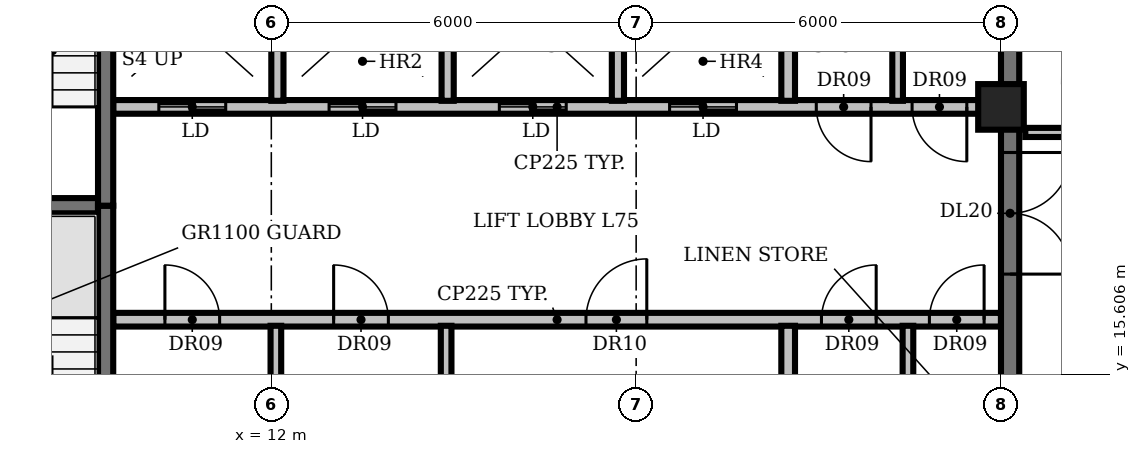
"""IFC4 building model, lengths in metres.
Left out: names, types, materials, properties, quantities, classifications, styles, units other than length and angle.
Written with IfcOpenShell. Run it as: python <this file> out.ifc"""

import sys

from ifc_helpers import new_model, si_unit, direction, frame, frame_2d, origin, origin_2d, place, context, subcontext, project, spatial, rectangle, circle, extrude, element, fill, save


model = new_model("IFC4")
c1 = context("Model", 3, precision=1e-05, world=origin(), true_north=direction((0.0, 1.0)))
c2 = subcontext(c1, "Body", "Model", "MODEL_VIEW")
j1 = project(units=[si_unit("LENGTHUNIT", "METRE"), si_unit("PLANEANGLEUNIT", "RADIAN")], contexts=[c1])
p1 = place(None, origin())
s1 = spatial("IfcSite", under=j1, at=p1, CompositionType="ELEMENT")
p2 = place(p1, origin())
s2 = spatial("IfcBuilding", under=s1, at=p2, CompositionType="ELEMENT")
p3 = place(p2, frame((0.0, 0.0, 335.6)))
s3 = spatial("IfcBuildingStorey", under=s2, at=p3, CompositionType="ELEMENT", Elevation=335.6)
p4 = place(p3, frame((24.0, 20.0, 0.0), z_axis=(0.0, 0.0, 1.0), x_axis=(1.0, 0.0, 0.0)))
e1 = element("IfcColumn", 1, at=p4, inside=s3, PredefinedType="COLUMN", context=c2, shape_type="SweptSolid", body=[
    extrude(circle(Radius=0.375, at=origin_2d()), origin(), (0.0, 0.0, 1.0), 3.9),
])
p5 = place(p3, frame((9.4, 16.5, 0.0), z_axis=(0.0, 0.0, 1.0), x_axis=(1.0, 0.0, 0.0)))
e2 = element("IfcWall", 2, at=p5, inside=s3, PredefinedType="PARTITIONING", context=c2, shape_type="SweptSolid", body=[
    extrude(rectangle(XDim=14.6, YDim=0.225, at=frame_2d((7.3, 0.0))), origin(), (0.0, 0.0, 1.0), 3.9),
])
p6 = place(p5, frame((0.85, 0.0, 0.0)))
e3 = element("IfcOpeningElement", 3, at=p6, cuts=e2, PredefinedType="OPENING", context=c2, shape_type="SweptSolid", body=[
    extrude(rectangle(XDim=0.9, YDim=2.1, at=frame_2d((0.45, 1.05))), frame((0.0, 0.123, 0.0), z_axis=(0.0, -1.0, 0.0), x_axis=(1.0, 0.0, 0.0)), (0.0, 0.0, 1.0), 0.245),
])
p7 = place(p5, frame((3.625, 0.0, 0.0)))
e4 = element("IfcOpeningElement", 4, at=p7, cuts=e2, PredefinedType="OPENING", context=c2, shape_type="SweptSolid", body=[
    extrude(rectangle(XDim=0.9, YDim=2.1, at=frame_2d((0.45, 1.05))), frame((0.0, 0.123, 0.0), z_axis=(0.0, -1.0, 0.0), x_axis=(1.0, 0.0, 0.0)), (0.0, 0.0, 1.0), 0.245),
])
p8 = place(p5, frame((7.775, 0.0, 0.0)))
e5 = element("IfcOpeningElement", 5, at=p8, cuts=e2, PredefinedType="OPENING", context=c2, shape_type="SweptSolid", body=[
    extrude(rectangle(XDim=1.0, YDim=2.1, at=frame_2d((0.5, 1.05))), frame((0.0, 0.123, 0.0), z_axis=(0.0, -1.0, 0.0), x_axis=(1.0, 0.0, 0.0)), (0.0, 0.0, 1.0), 0.245),
])
p9 = place(p5, frame((11.647, 0.0, 0.0)))
e6 = element("IfcOpeningElement", 6, at=p9, cuts=e2, PredefinedType="OPENING", context=c2, shape_type="SweptSolid", body=[
    extrude(rectangle(XDim=0.9, YDim=2.1, at=frame_2d((0.45, 1.05))), frame((0.0, 0.123, 0.0), z_axis=(0.0, -1.0, 0.0), x_axis=(1.0, 0.0, 0.0)), (0.0, 0.0, 1.0), 0.245),
])
p10 = place(p5, frame((13.423, 0.0, 0.0)))
e7 = element("IfcOpeningElement", 7, at=p10, cuts=e2, PredefinedType="OPENING", context=c2, shape_type="SweptSolid", body=[
    extrude(rectangle(XDim=0.9, YDim=2.1, at=frame_2d((0.45, 1.05))), frame((0.0, 0.123, 0.0), z_axis=(0.0, -1.0, 0.0), x_axis=(1.0, 0.0, 0.0)), (0.0, 0.0, 1.0), 0.245),
])
p11 = place(p3, frame((6.0, 18.375, 0.0), z_axis=(0.0, 0.0, 1.0), x_axis=(1.0, 0.0, 0.0)))
e8 = element("IfcWall", 8, at=p11, inside=s3, PredefinedType="SHEAR", context=c2, shape_type="SweptSolid", body=[
    extrude(rectangle(XDim=3.15, YDim=0.25, at=frame_2d((1.575, 0.0))), origin(), (0.0, 0.0, 1.0), 3.9),
])
p12 = place(p3, frame((24.0, 20.0, 0.0), z_axis=(0.0, 0.0, 1.0), x_axis=(-1.0, 0.0, 0.0)))
e9 = element("IfcWall", 9, at=p12, inside=s3, PredefinedType="PARTITIONING", context=c2, shape_type="SweptSolid", body=[
    extrude(rectangle(XDim=14.6, YDim=0.225, at=frame_2d((7.3, 0.0))), origin(), (0.0, 0.0, 1.0), 3.9),
])
p13 = place(p12, frame((12.75, 0.0, 0.0)))
e10 = element("IfcOpeningElement", 10, at=p13, cuts=e9, PredefinedType="OPENING", context=c2, shape_type="SweptSolid", body=[
    extrude(rectangle(XDim=1.1, YDim=2.1, at=frame_2d((0.55, 1.05))), frame((0.0, 0.123, 0.0), z_axis=(0.0, -1.0, 0.0), x_axis=(1.0, 0.0, 0.0)), (0.0, 0.0, 1.0), 0.245),
])
p14 = place(p12, frame((9.95, 0.0, 0.0)))
e11 = element("IfcOpeningElement", 11, at=p14, cuts=e9, PredefinedType="OPENING", context=c2, shape_type="SweptSolid", body=[
    extrude(rectangle(XDim=1.1, YDim=2.1, at=frame_2d((0.55, 1.05))), frame((0.0, 0.123, 0.0), z_axis=(0.0, -1.0, 0.0), x_axis=(1.0, 0.0, 0.0)), (0.0, 0.0, 1.0), 0.245),
])
p15 = place(p12, frame((7.15, 0.0, 0.0)))
e12 = element("IfcOpeningElement", 12, at=p15, cuts=e9, PredefinedType="OPENING", context=c2, shape_type="SweptSolid", body=[
    extrude(rectangle(XDim=1.1, YDim=2.1, at=frame_2d((0.55, 1.05))), frame((0.0, 0.123, 0.0), z_axis=(0.0, -1.0, 0.0), x_axis=(1.0, 0.0, 0.0)), (0.0, 0.0, 1.0), 0.245),
])
p16 = place(p12, frame((4.35, 0.0, 0.0)))
e13 = element("IfcOpeningElement", 13, at=p16, cuts=e9, PredefinedType="OPENING", context=c2, shape_type="SweptSolid", body=[
    extrude(rectangle(XDim=1.1, YDim=2.1, at=frame_2d((0.55, 1.05))), frame((0.0, 0.123, 0.0), z_axis=(0.0, -1.0, 0.0), x_axis=(1.0, 0.0, 0.0)), (0.0, 0.0, 1.0), 0.245),
])
p17 = place(p12, frame((2.137, 0.0, 0.0)))
e14 = element("IfcOpeningElement", 14, at=p17, cuts=e9, PredefinedType="OPENING", context=c2, shape_type="SweptSolid", body=[
    extrude(rectangle(XDim=0.9, YDim=2.1, at=frame_2d((0.45, 1.05))), frame((0.0, 0.123, 0.0), z_axis=(0.0, -1.0, 0.0), x_axis=(1.0, 0.0, 0.0)), (0.0, 0.0, 1.0), 0.245),
])
p18 = place(p12, frame((0.562, 0.0, 0.0)))
e15 = element("IfcOpeningElement", 15, at=p18, cuts=e9, PredefinedType="OPENING", context=c2, shape_type="SweptSolid", body=[
    extrude(rectangle(XDim=0.9, YDim=2.1, at=frame_2d((0.45, 1.05))), frame((0.0, 0.123, 0.0), z_axis=(0.0, -1.0, 0.0), x_axis=(1.0, 0.0, 0.0)), (0.0, 0.0, 1.0), 0.245),
])
p19 = place(p3, frame((9.275, 18.375, 0.0), z_axis=(0.0, 0.0, 1.0), x_axis=(0.0, -1.0, 0.0)))
e16 = element("IfcWall", 16, at=p19, inside=s3, PredefinedType="SHEAR", context=c2, shape_type="SweptSolid", body=[
    extrude(rectangle(XDim=6.55, YDim=0.25, at=frame_2d((3.275, 0.0))), origin(), (0.0, 0.0, 1.0), 3.9),
])
p20 = place(p19, frame((5.075, 0.0, 0.0)))
e17 = element("IfcOpeningElement", 17, at=p20, cuts=e16, PredefinedType="OPENING", context=c2, shape_type="SweptSolid", body=[
    extrude(rectangle(XDim=1.0, YDim=2.1, at=frame_2d((0.5, 1.05))), frame((0.0, 0.135, 0.0), z_axis=(0.0, -1.0, 0.0), x_axis=(1.0, 0.0, 0.0)), (0.0, 0.0, 1.0), 0.27),
])
p21 = place(p3, frame((9.275, 18.375, 0.0), z_axis=(0.0, 0.0, 1.0), x_axis=(0.0, 1.0, 0.0)))
e18 = element("IfcWall", 18, at=p21, inside=s3, PredefinedType="SHEAR", context=c2, shape_type="SweptSolid", body=[
    extrude(rectangle(XDim=6.425, YDim=0.25, at=frame_2d((3.212, 0.0))), origin(), (0.0, 0.0, 1.0), 3.9),
])
p22 = place(p3, frame((12.075, 13.8, 0.0), z_axis=(0.0, 0.0, 1.0), x_axis=(0.0, 1.0, 0.0)))
e19 = element("IfcWall", 19, at=p22, inside=s3, PredefinedType="PARTITIONING", context=c2, shape_type="SweptSolid", body=[
    extrude(rectangle(XDim=2.6, YDim=0.175, at=frame_2d((1.3, 0.0))), origin(), (0.0, 0.0, 1.0), 3.9),
])
p23 = place(p3, frame((12.1, 20.1, 0.0), z_axis=(0.0, 0.0, 1.0), x_axis=(0.0, 1.0, 0.0)))
e20 = element("IfcWall", 20, at=p23, inside=s3, PredefinedType="SOLIDWALL", context=c2, shape_type="SweptSolid", body=[
    extrude(rectangle(XDim=2.6, YDim=0.2, at=frame_2d((1.3, 0.0))), origin(), (0.0, 0.0, 1.0), 3.9),
])
p24 = place(p3, frame((14.875, 13.8, 0.0), z_axis=(0.0, 0.0, 1.0), x_axis=(0.0, 1.0, 0.0)))
e21 = element("IfcWall", 21, at=p24, inside=s3, PredefinedType="PARTITIONING", context=c2, shape_type="SweptSolid", body=[
    extrude(rectangle(XDim=2.6, YDim=0.175, at=frame_2d((1.3, 0.0))), origin(), (0.0, 0.0, 1.0), 3.9),
])
for number, where, z_axis, x_axis in (
    (22, (14.9, 20.1, 0.0), (0.0, 0.0, 1.0), (0.0, 1.0, 0.0)),
    (23, (17.7, 20.1, 0.0), (0.0, 0.0, 1.0), (0.0, 1.0, 0.0)),
):
    element("IfcWall", number, at=place(p3, frame(where, z_axis=z_axis, x_axis=x_axis)), inside=s3, PredefinedType="SOLIDWALL", context=c2, shape_type="SweptSolid", body=[
        extrude(rectangle(XDim=2.6, YDim=0.2, at=frame_2d((1.3, 0.0))), origin(), (0.0, 0.0, 1.0), 3.9),
    ])
for number, where, z_axis, x_axis in (
    (24, (20.5, 13.8, 0.0), (0.0, 0.0, 1.0), (0.0, 1.0, 0.0)),
    (25, (20.5, 20.1, 0.0), (0.0, 0.0, 1.0), (0.0, 1.0, 0.0)),
):
    element("IfcWall", number, at=place(p3, frame(where, z_axis=z_axis, x_axis=x_axis)), inside=s3, PredefinedType="PARTITIONING", context=c2, shape_type="SweptSolid", body=[
        extrude(rectangle(XDim=2.6, YDim=0.225, at=frame_2d((1.3, 0.0))), origin(), (0.0, 0.0, 1.0), 3.9),
    ])
for number, where, z_axis, x_axis in (
    (26, (22.3, 20.1, 0.0), (0.0, 0.0, 1.0), (0.0, 1.0, 0.0)),
    (27, (22.47, 13.8, 0.0), (0.0, 0.0, 1.0), (0.0, 1.0, 0.0)),
):
    element("IfcWall", number, at=place(p3, frame(where, z_axis=z_axis, x_axis=x_axis)), inside=s3, PredefinedType="PARTITIONING", context=c2, shape_type="SweptSolid", body=[
        extrude(rectangle(XDim=2.6, YDim=0.175, at=frame_2d((1.3, 0.0))), origin(), (0.0, 0.0, 1.0), 3.9),
    ])
p25 = place(p3, frame((24.15, 25.705, 0.0), z_axis=(0.0, 0.0, 1.0), x_axis=(0.0, -1.0, 0.0)))
e28 = element("IfcWall", 28, at=p25, inside=s3, PredefinedType="SHEAR", context=c2, shape_type="SweptSolid", body=[
    extrude(rectangle(XDim=20.605, YDim=0.3, at=frame_2d((10.302, 0.0))), origin(), (0.0, 0.0, 1.0), 3.9),
])
p26 = place(p25, frame((18.555, 0.0, 0.0)))
e29 = element("IfcOpeningElement", 29, at=p26, cuts=e28, PredefinedType="OPENING", context=c2, shape_type="SweptSolid", body=[
    extrude(rectangle(XDim=1.5, YDim=2.1, at=frame_2d((0.75, 1.05))), frame((0.0, 0.16, 0.0), z_axis=(0.0, -1.0, 0.0), x_axis=(1.0, 0.0, 0.0)), (0.0, 0.0, 1.0), 0.32),
])
p27 = place(p25, frame((12.455, 0.0, 0.0)))
e30 = element("IfcOpeningElement", 30, at=p27, cuts=e28, PredefinedType="OPENING", context=c2, shape_type="SweptSolid", body=[
    extrude(rectangle(XDim=0.9, YDim=2.1, at=frame_2d((0.45, 1.05))), frame((0.0, 0.16, 0.0), z_axis=(0.0, -1.0, 0.0), x_axis=(1.0, 0.0, 0.0)), (0.0, 0.0, 1.0), 0.32),
])
p28 = place(p25, frame((6.455, 0.0, 0.0)))
e31 = element("IfcOpeningElement", 31, at=p28, cuts=e28, PredefinedType="OPENING", context=c2, shape_type="SweptSolid", body=[
    extrude(rectangle(XDim=2.0, YDim=2.1, at=frame_2d((1.0, 1.05))), frame((0.0, 0.16, 0.0), z_axis=(0.0, -1.0, 0.0), x_axis=(1.0, 0.0, 0.0)), (0.0, 0.0, 1.0), 0.32),
])
p29 = place(p3, frame((24.4, 19.58, 0.0), z_axis=(0.0, 0.0, 1.0), x_axis=(1.0, 0.0, 0.0)))
e32 = element("IfcWall", 32, at=p29, inside=s3, PredefinedType="PARTITIONING", context=c2, shape_type="SweptSolid", body=[
    extrude(rectangle(XDim=1.41, YDim=0.15, at=frame_2d((0.705, 0.0))), origin(), (0.0, 0.0, 1.0), 2.95),
])
p30 = place(p6, origin())
e33 = element("IfcDoor", 33, at=p30, inside=s3, OperationType="SINGLE_SWING_LEFT", PredefinedType="DOOR", context=c2, shape_type="SweptSolid", body=[
    extrude(rectangle(XDim=0.9, YDim=2.1, at=frame_2d((0.45, 1.05))), frame((0.0, 0.025, 0.0), z_axis=(0.0, -1.0, 0.0), x_axis=(1.0, 0.0, 0.0)), (0.0, 0.0, 1.0), 0.05),
])
fill(e3, e33)
p31 = place(p7, origin())
e34 = element("IfcDoor", 34, at=p31, inside=s3, OperationType="SINGLE_SWING_LEFT", PredefinedType="DOOR", context=c2, shape_type="SweptSolid", body=[
    extrude(rectangle(XDim=0.9, YDim=2.1, at=frame_2d((0.45, 1.05))), frame((0.0, 0.025, 0.0), z_axis=(0.0, -1.0, 0.0), x_axis=(1.0, 0.0, 0.0)), (0.0, 0.0, 1.0), 0.05),
])
fill(e4, e34)
p32 = place(p8, origin())
e35 = element("IfcDoor", 35, at=p32, inside=s3, OperationType="SINGLE_SWING_RIGHT", PredefinedType="DOOR", context=c2, shape_type="SweptSolid", body=[
    extrude(rectangle(XDim=1.0, YDim=2.1, at=frame_2d((0.5, 1.05))), frame((0.0, 0.025, 0.0), z_axis=(0.0, -1.0, 0.0), x_axis=(1.0, 0.0, 0.0)), (0.0, 0.0, 1.0), 0.05),
])
fill(e5, e35)
p33 = place(p9, origin())
e36 = element("IfcDoor", 36, at=p33, inside=s3, OperationType="SINGLE_SWING_RIGHT", PredefinedType="DOOR", context=c2, shape_type="SweptSolid", body=[
    extrude(rectangle(XDim=0.9, YDim=2.1, at=frame_2d((0.45, 1.05))), frame((0.0, 0.025, 0.0), z_axis=(0.0, -1.0, 0.0), x_axis=(1.0, 0.0, 0.0)), (0.0, 0.0, 1.0), 0.05),
])
fill(e6, e36)
p34 = place(p10, origin())
e37 = element("IfcDoor", 37, at=p34, inside=s3, OperationType="SINGLE_SWING_RIGHT", PredefinedType="DOOR", context=c2, shape_type="SweptSolid", body=[
    extrude(rectangle(XDim=0.9, YDim=2.1, at=frame_2d((0.45, 1.05))), frame((0.0, 0.025, 0.0), z_axis=(0.0, -1.0, 0.0), x_axis=(1.0, 0.0, 0.0)), (0.0, 0.0, 1.0), 0.05),
])
fill(e7, e37)
p35 = place(p13, origin())
e38 = element("IfcDoor", 38, at=p35, inside=s3, OperationType="DOUBLE_DOOR_SLIDING", PredefinedType="DOOR", context=c2, shape_type="SweptSolid", body=[
    extrude(rectangle(XDim=1.1, YDim=2.1, at=frame_2d((0.55, 1.05))), frame((0.0, 0.025, 0.0), z_axis=(0.0, -1.0, 0.0), x_axis=(1.0, 0.0, 0.0)), (0.0, 0.0, 1.0), 0.05),
])
fill(e10, e38)
p36 = place(p14, origin())
e39 = element("IfcDoor", 39, at=p36, inside=s3, OperationType="DOUBLE_DOOR_SLIDING", PredefinedType="DOOR", context=c2, shape_type="SweptSolid", body=[
    extrude(rectangle(XDim=1.1, YDim=2.1, at=frame_2d((0.55, 1.05))), frame((0.0, 0.025, 0.0), z_axis=(0.0, -1.0, 0.0), x_axis=(1.0, 0.0, 0.0)), (0.0, 0.0, 1.0), 0.05),
])
fill(e11, e39)
p37 = place(p15, origin())
e40 = element("IfcDoor", 40, at=p37, inside=s3, OperationType="DOUBLE_DOOR_SLIDING", PredefinedType="DOOR", context=c2, shape_type="SweptSolid", body=[
    extrude(rectangle(XDim=1.1, YDim=2.1, at=frame_2d((0.55, 1.05))), frame((0.0, 0.025, 0.0), z_axis=(0.0, -1.0, 0.0), x_axis=(1.0, 0.0, 0.0)), (0.0, 0.0, 1.0), 0.05),
])
fill(e12, e40)
p38 = place(p16, origin())
e41 = element("IfcDoor", 41, at=p38, inside=s3, OperationType="DOUBLE_DOOR_SLIDING", PredefinedType="DOOR", context=c2, shape_type="SweptSolid", body=[
    extrude(rectangle(XDim=1.1, YDim=2.1, at=frame_2d((0.55, 1.05))), frame((0.0, 0.025, 0.0), z_axis=(0.0, -1.0, 0.0), x_axis=(1.0, 0.0, 0.0)), (0.0, 0.0, 1.0), 0.05),
])
fill(e13, e41)
p39 = place(p17, origin())
e42 = element("IfcDoor", 42, at=p39, inside=s3, OperationType="SINGLE_SWING_LEFT", PredefinedType="DOOR", context=c2, shape_type="SweptSolid", body=[
    extrude(rectangle(XDim=0.9, YDim=2.1, at=frame_2d((0.45, 1.05))), frame((0.0, 0.025, 0.0), z_axis=(0.0, -1.0, 0.0), x_axis=(1.0, 0.0, 0.0)), (0.0, 0.0, 1.0), 0.05),
])
fill(e14, e42)
p40 = place(p18, origin())
e43 = element("IfcDoor", 43, at=p40, inside=s3, OperationType="SINGLE_SWING_LEFT", PredefinedType="DOOR", context=c2, shape_type="SweptSolid", body=[
    extrude(rectangle(XDim=0.9, YDim=2.1, at=frame_2d((0.45, 1.05))), frame((0.0, 0.025, 0.0), z_axis=(0.0, -1.0, 0.0), x_axis=(1.0, 0.0, 0.0)), (0.0, 0.0, 1.0), 0.05),
])
fill(e15, e43)
p41 = place(p28, origin())
e44 = element("IfcDoor", 44, at=p41, inside=s3, OperationType="DOUBLE_DOOR_SINGLE_SWING", PredefinedType="DOOR", context=c2, shape_type="SweptSolid", body=[
    extrude(rectangle(XDim=2.0, YDim=2.1, at=frame_2d((1.0, 1.05))), frame((0.0, 0.025, 0.0), z_axis=(0.0, -1.0, 0.0), x_axis=(1.0, 0.0, 0.0)), (0.0, 0.0, 1.0), 0.05),
])
fill(e31, e44)
save(model, sys.argv[1])
